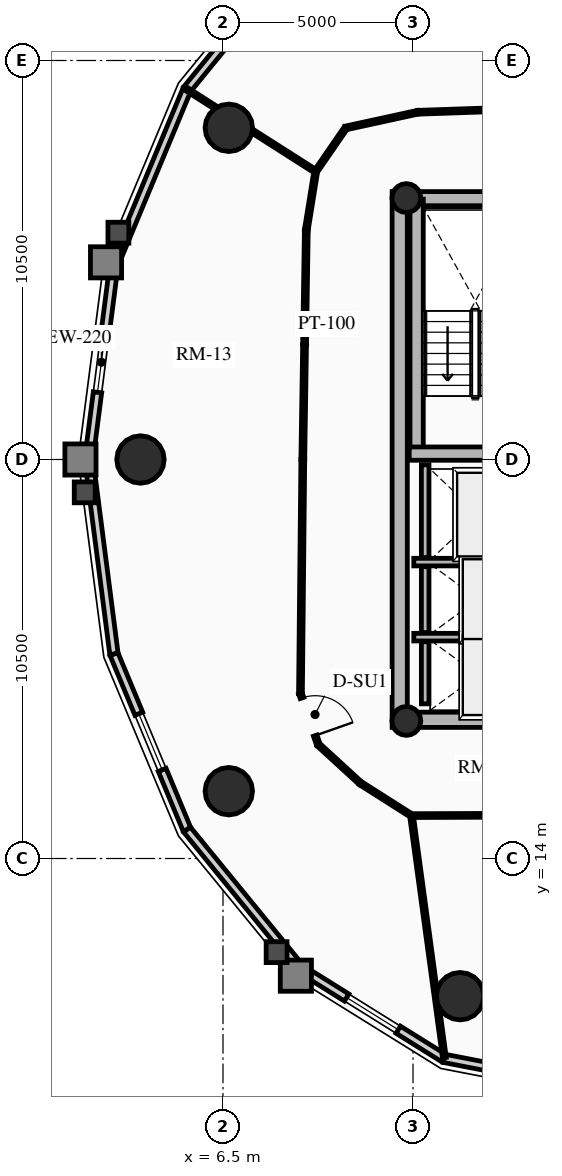
"""IFC4 building model, lengths in metres.
Left out: names, types, materials, properties, quantities, classifications, styles, units other than length and angle.
Written with IfcOpenShell. Run it as: python <this file> out.ifc"""

import sys

from ifc_helpers import new_model, si_unit, direction, frame, frame_2d, origin, origin_2d, place, context, subcontext, project, spatial, rectangle, circle, hollow_circle, extrude, source, transform, mapped, element, fill, save


model = new_model("IFC4")
c1 = context("Model", 3, precision=1e-05, world=origin(), true_north=direction((0.0, 1.0)))
c2 = subcontext(c1, "Body", "Model", "MODEL_VIEW")
j1 = project(units=[si_unit("LENGTHUNIT", "METRE"), si_unit("PLANEANGLEUNIT", "RADIAN")], contexts=[c1])
p1 = place(None, origin())
s1 = spatial("IfcSite", under=j1, at=p1, CompositionType="ELEMENT")
p2 = place(p1, origin())
s2 = spatial("IfcBuilding", under=s1, at=p2, CompositionType="ELEMENT")
p3 = place(p2, frame((0.0, 0.0, 186.52)))
s3 = spatial("IfcBuildingStorey", under=s2, at=p3, CompositionType="ELEMENT", Elevation=186.52)
p4 = place(p3, frame((11.15, 17.45, 0.0), z_axis=(0.0, 0.0, 1.0), x_axis=(0.0, 1.0, 0.0)))
e1 = element("IfcWall", 1, at=p4, inside=s3, PredefinedType="SHEAR", context=c2, shape_type="SweptSolid", body=[
    extrude(rectangle(XDim=14.1, YDim=0.4, at=frame_2d((7.05, 0.0))), origin(), (0.0, 0.0, 1.0), 2.91),
])
p5 = place(p3, frame((11.15, 17.65, 0.0), z_axis=(0.0, 0.0, 1.0), x_axis=(1.0, 0.0, 0.0)))
e2 = element("IfcWall", 2, at=p5, inside=s3, PredefinedType="SHEAR", context=c2, shape_type="SweptSolid", body=[
    extrude(rectangle(XDim=10.7, YDim=0.4, at=frame_2d((5.35, 0.0))), origin(), (0.0, 0.0, 1.0), 2.91),
])
m1 = source(origin(), c2, "Body", "SweptSolid", [
    extrude(rectangle(XDim=1.5, YDim=2.02, at=frame_2d((0.75, 1.01))), frame((0.0, 0.21, 0.0), z_axis=(0.0, -1.0, 0.0), x_axis=(1.0, 0.0, 0.0)), (0.0, 0.0, 1.0), 0.42),
])
p6 = place(p5, frame((5.45, 0.0, 0.0)))
e3 = element("IfcOpeningElement", 3, at=p6, cuts=e2, PredefinedType="OPENING", context=c2, shape_type="MappedRepresentation", body=[
    mapped(m1, transform((0.0, 0.0, 0.0), x_axis=(1.0, 0.0, 0.0), y_axis=(0.0, 1.0, 0.0), z_axis=(0.0, 0.0, 1.0), scale=1.0)),
])
p7 = place(p3, frame((11.15, 31.35, 0.0), z_axis=(0.0, 0.0, 1.0), x_axis=(1.0, 0.0, 0.0)))
e4 = element("IfcWall", 4, at=p7, inside=s3, PredefinedType="SHEAR", context=c2, shape_type="SweptSolid", body=[
    extrude(rectangle(XDim=10.7, YDim=0.4, at=frame_2d((5.35, 0.0))), origin(), (0.0, 0.0, 1.0), 2.91),
])
p8 = place(p7, frame((4.6, 0.0, 0.0)))
e5 = element("IfcOpeningElement", 5, at=p8, cuts=e4, PredefinedType="OPENING", context=c2, shape_type="MappedRepresentation", body=[
    mapped(m1, transform((0.0, 0.0, 0.0), x_axis=(1.0, 0.0, 0.0), y_axis=(0.0, 1.0, 0.0), z_axis=(0.0, 0.0, 1.0), scale=1.0)),
])
p9 = place(p3, frame((11.595, 24.655, 0.0), z_axis=(0.0, 0.0, 1.0), x_axis=(0.0, 1.0, 0.0)))
e6 = element("IfcWall", 6, at=p9, inside=s3, PredefinedType="SHEAR", context=c2, shape_type="SweptSolid", body=[
    extrude(rectangle(XDim=6.695, YDim=0.35, at=frame_2d((3.348, 0.0))), origin(), (0.0, 0.0, 1.0), 2.91),
])
p10 = place(p3, frame((11.4, 24.655, 0.0), z_axis=(0.0, 0.0, 1.0), x_axis=(1.0, 0.0, 0.0)))
e7 = element("IfcWall", 7, at=p10, inside=s3, PredefinedType="SHEAR", context=c2, shape_type="SweptSolid", body=[
    extrude(rectangle(XDim=3.285, YDim=0.35, at=frame_2d((1.643, 0.0))), origin(), (0.0, 0.0, 1.0), 2.91),
])
for number, where, z_axis, x_axis in (
    (8, (11.325, 17.62, 0.0), (0.0, 0.0, 1.0), (1.0, 0.0, 0.0)),
    (9, (11.325, 31.38, 0.0), (0.0, 0.0, 1.0), (1.0, 0.0, 0.0)),
):
    element("IfcColumn", number, at=place(p3, frame(where, z_axis=z_axis, x_axis=x_axis)), inside=s3, PredefinedType="COLUMN", context=c2, shape_type="SweptSolid", body=[
        extrude(hollow_circle(Radius=0.38, WallThickness=0.032, at=origin_2d()), origin(), (0.0, 0.0, 1.0), 2.91),
    ])
for number, where, z_axis, x_axis in (
    (10, (6.653, 33.229, 0.0), (0.0, 0.0, 1.0), (1.0, 0.0, 0.0)),
    (11, (4.328, 24.5, 0.0), (0.0, 0.0, 1.0), (1.0, 0.0, 0.0)),
    (12, (6.653, 15.771, 0.0), (0.0, 0.0, 1.0), (1.0, 0.0, 0.0)),
    (13, (12.739, 10.377, 0.0), (0.0, 0.0, 1.0), (1.0, 0.0, 0.0)),
):
    element("IfcColumn", number, at=place(p3, frame(where, z_axis=z_axis, x_axis=x_axis)), inside=s3, PredefinedType="USERDEFINED", context=c2, shape_type="SweptSolid", body=[
        extrude(circle(Radius=0.625, at=origin_2d()), origin(), (0.0, 0.0, 1.0), 2.91),
    ])
p11 = place(p3, frame((5.553, 34.24, 0.0), z_axis=(0.0, 0.0, 1.0), x_axis=(0.632470615287, 0.774584353572, 0.0)))
e14 = element("IfcWall", 14, at=p11, inside=s3, PredefinedType="SOLIDWALL", context=c2, shape_type="SweptSolid", body=[
    extrude(rectangle(XDim=4.733, YDim=0.22, at=frame_2d((2.366, 0.0))), origin(), (0.0, 0.0, 1.0), 2.245),
])
m2 = source(origin(), c2, "Body", "SweptSolid", [
    extrude(rectangle(XDim=1.6, YDim=1.3, at=frame_2d((0.8, 0.65))), frame((0.0, 0.12, 0.0), z_axis=(0.0, -1.0, 0.0), x_axis=(1.0, 0.0, 0.0)), (0.0, 0.0, 1.0), 0.24),
])
p12 = place(p11, frame((1.566, 0.0, 0.65)))
e15 = element("IfcOpeningElement", 15, at=p12, cuts=e14, PredefinedType="OPENING", context=c2, shape_type="MappedRepresentation", body=[
    mapped(m2, transform((0.0, 0.0, 0.0), x_axis=(1.0, 0.0, 0.0), y_axis=(0.0, 1.0, 0.0), z_axis=(0.0, 0.0, 1.0), scale=1.0)),
])
p13 = place(p3, frame((3.631, 29.62, 0.0), z_axis=(0.0, 0.0, 1.0), x_axis=(0.384144094086, 0.923273152961, 0.0)))
e16 = element("IfcWall", 16, at=p13, inside=s3, PredefinedType="SOLIDWALL", context=c2, shape_type="SweptSolid", body=[
    extrude(rectangle(XDim=5.003, YDim=0.22, at=frame_2d((2.501, 0.0))), origin(), (0.0, 0.0, 1.0), 2.245),
])
p14 = place(p3, frame((2.969, 24.5, 0.0), z_axis=(0.0, 0.0, 1.0), x_axis=(0.128287912609, 0.991736966881, 0.0)))
e17 = element("IfcWall", 17, at=p14, inside=s3, PredefinedType="SOLIDWALL", context=c2, shape_type="SweptSolid", body=[
    extrude(rectangle(XDim=5.163, YDim=0.22, at=frame_2d((2.582, 0.0))), origin(), (0.0, 0.0, 1.0), 2.245),
])
p15 = place(p14, frame((1.782, 0.0, 0.65)))
e18 = element("IfcOpeningElement", 18, at=p15, cuts=e17, PredefinedType="OPENING", context=c2, shape_type="MappedRepresentation", body=[
    mapped(m2, transform((0.0, 0.0, 0.0), x_axis=(1.0, 0.0, 0.0), y_axis=(0.0, 1.0, 0.0), z_axis=(0.0, 0.0, 1.0), scale=1.0)),
])
p16 = place(p3, frame((3.631, 19.38, 0.0), z_axis=(0.0, 0.0, 1.0), x_axis=(-0.128287912609, 0.991736966881, 0.0)))
e19 = element("IfcWall", 19, at=p16, inside=s3, PredefinedType="SOLIDWALL", context=c2, shape_type="SweptSolid", body=[
    extrude(rectangle(XDim=5.163, YDim=0.22, at=frame_2d((2.582, 0.0))), origin(), (0.0, 0.0, 1.0), 2.245),
])
p17 = place(p3, frame((5.553, 14.76, 0.0), z_axis=(0.0, 0.0, 1.0), x_axis=(-0.384144094086, 0.923273152961, 0.0)))
e20 = element("IfcWall", 20, at=p17, inside=s3, PredefinedType="SOLIDWALL", context=c2, shape_type="SweptSolid", body=[
    extrude(rectangle(XDim=5.003, YDim=0.22, at=frame_2d((2.501, 0.0))), origin(), (0.0, 0.0, 1.0), 2.245),
])
p18 = place(p17, frame((1.702, 0.0, 0.65)))
e21 = element("IfcOpeningElement", 21, at=p18, cuts=e20, PredefinedType="OPENING", context=c2, shape_type="MappedRepresentation", body=[
    mapped(m2, transform((0.0, 0.0, 0.0), x_axis=(1.0, 0.0, 0.0), y_axis=(0.0, 1.0, 0.0), z_axis=(0.0, 0.0, 1.0), scale=1.0)),
])
p19 = place(p3, frame((8.547, 11.094, 0.0), z_axis=(0.0, 0.0, 1.0), x_axis=(-0.632470615287, 0.774584353572, 0.0)))
e22 = element("IfcWall", 22, at=p19, inside=s3, PredefinedType="SOLIDWALL", context=c2, shape_type="SweptSolid", body=[
    extrude(rectangle(XDim=4.733, YDim=0.22, at=frame_2d((2.366, 0.0))), origin(), (0.0, 0.0, 1.0), 2.245),
])
p20 = place(p3, frame((12.319, 8.741, 0.0), z_axis=(0.0, 0.0, 1.0), x_axis=(-0.848399108042, 0.529357113368, 0.0)))
e23 = element("IfcWall", 23, at=p20, inside=s3, PredefinedType="SOLIDWALL", context=c2, shape_type="SweptSolid", body=[
    extrude(rectangle(XDim=4.446, YDim=0.22, at=frame_2d((2.223, 0.0))), origin(), (0.0, 0.0, 1.0), 2.245),
])
p21 = place(p20, frame((1.423, 0.0, 0.65)))
e24 = element("IfcOpeningElement", 24, at=p21, cuts=e23, PredefinedType="OPENING", context=c2, shape_type="MappedRepresentation", body=[
    mapped(m2, transform((0.0, 0.0, 0.0), x_axis=(1.0, 0.0, 0.0), y_axis=(0.0, 1.0, 0.0), z_axis=(0.0, 0.0, 1.0), scale=1.0)),
])
p22 = place(p3, frame((16.5, 7.93, 0.0), z_axis=(0.0, 0.0, 1.0), x_axis=(-0.981703883443, 0.190413983815, 0.0)))
e25 = element("IfcWall", 25, at=p22, inside=s3, PredefinedType="SOLIDWALL", context=c2, shape_type="SweptSolid", body=[
    extrude(rectangle(XDim=4.259, YDim=0.22, at=frame_2d((2.13, 0.0))), origin(), (0.0, 0.0, 1.0), 2.245),
])
p23 = place(p22, frame((1.33, 0.0, 0.65)))
e26 = element("IfcOpeningElement", 26, at=p23, cuts=e25, PredefinedType="OPENING", context=c2, shape_type="MappedRepresentation", body=[
    mapped(m2, transform((0.0, 0.0, 0.0), x_axis=(1.0, 0.0, 0.0), y_axis=(0.0, 1.0, 0.0), z_axis=(0.0, 0.0, 1.0), scale=1.0)),
])
p24 = place(p3, frame((11.52, 21.8, 0.0), z_axis=(0.0, 0.0, 1.0), x_axis=(1.0, 0.0, 0.0)))
e27 = element("IfcWall", 27, at=p24, inside=s3, PredefinedType="SHEAR", context=c2, shape_type="SweptSolid", body=[
    extrude(rectangle(XDim=2.97, YDim=0.2, at=frame_2d((1.485, 0.0))), origin(), (0.0, 0.0, 1.0), 2.91),
])
p25 = place(p3, frame((11.82, 21.92, 0.0), z_axis=(0.0, 0.0, 1.0), x_axis=(0.0, 1.0, 0.0)))
e28 = element("IfcWall", 28, at=p25, inside=s3, PredefinedType="SHEAR", context=c2, shape_type="SweptSolid", body=[
    extrude(rectangle(XDim=2.44, YDim=0.2, at=frame_2d((1.22, 0.0))), origin(), (0.0, 0.0, 1.0), 2.91),
])
p26 = place(p3, frame((11.52, 19.825, 0.0), z_axis=(0.0, 0.0, 1.0), x_axis=(1.0, 0.0, 0.0)))
e29 = element("IfcWall", 29, at=p26, inside=s3, PredefinedType="SHEAR", context=c2, shape_type="SweptSolid", body=[
    extrude(rectangle(XDim=2.97, YDim=0.2, at=frame_2d((1.485, 0.0))), origin(), (0.0, 0.0, 1.0), 2.91),
])
p27 = place(p3, frame((11.82, 19.945, 0.0), z_axis=(0.0, 0.0, 1.0), x_axis=(0.0, 1.0, 0.0)))
e30 = element("IfcWall", 30, at=p27, inside=s3, PredefinedType="SHEAR", context=c2, shape_type="SweptSolid", body=[
    extrude(rectangle(XDim=1.735, YDim=0.2, at=frame_2d((0.867, 0.0))), origin(), (0.0, 0.0, 1.0), 2.91),
])
p28 = place(p3, frame((11.82, 18.07, 0.0), z_axis=(0.0, 0.0, 1.0), x_axis=(0.0, 1.0, 0.0)))
e31 = element("IfcWall", 31, at=p28, inside=s3, PredefinedType="SHEAR", context=c2, shape_type="SweptSolid", body=[
    extrude(rectangle(XDim=1.635, YDim=0.2, at=frame_2d((0.817, 0.0))), origin(), (0.0, 0.0, 1.0), 2.91),
])
p29 = place(p3, frame((18.143, 33.86, 0.0), z_axis=(0.0, 0.0, 1.0), x_axis=(-0.999419208319, -0.034077060363, 0.0)))
e32 = element("IfcWall", 32, at=p29, inside=s3, PredefinedType="MOVABLE", context=c2, shape_type="SweptSolid", body=[
    extrude(rectangle(XDim=6.527, YDim=0.1, at=frame_2d((3.263, 0.0))), origin(), (0.0, 0.0, 1.0), 2.245),
])
m3 = source(origin(), c2, "Body", "SweptSolid", [
    extrude(rectangle(XDim=1.05, YDim=2.015, at=frame_2d((0.525, 1.007))), frame((0.0, 0.06, 0.0), z_axis=(0.0, -1.0, 0.0), x_axis=(1.0, 0.0, 0.0)), (0.0, 0.0, 1.0), 0.12),
])
p30 = place(p29, frame((2.738, 0.0, 0.0)))
e33 = element("IfcOpeningElement", 33, at=p30, cuts=e32, PredefinedType="OPENING", context=c2, shape_type="MappedRepresentation", body=[
    mapped(m3, transform((0.0, 0.0, 0.0), x_axis=(1.0, 0.0, 0.0), y_axis=(0.0, 1.0, 0.0), z_axis=(0.0, 0.0, 1.0), scale=1.0)),
])
p31 = place(p3, frame((11.62, 33.637, 0.0), z_axis=(0.0, 0.0, 1.0), x_axis=(-0.97702579435, -0.213121085711, 0.0)))
e34 = element("IfcWall", 34, at=p31, inside=s3, PredefinedType="MOVABLE", context=c2, shape_type="SweptSolid", body=[
    extrude(rectangle(XDim=1.935, YDim=0.1, at=frame_2d((0.967, 0.0))), origin(), (0.0, 0.0, 1.0), 2.245),
])
p32 = place(p3, frame((9.729, 33.225, 0.0), z_axis=(0.0, 0.0, 1.0), x_axis=(-0.567183649484, -0.82359134755, 0.0)))
e35 = element("IfcWall", 35, at=p32, inside=s3, PredefinedType="MOVABLE", context=c2, shape_type="SweptSolid", body=[
    extrude(rectangle(XDim=1.392, YDim=0.1, at=frame_2d((0.696, 0.0))), origin(), (0.0, 0.0, 1.0), 2.245),
])
p33 = place(p3, frame((8.94, 32.078, 0.0), z_axis=(0.0, 0.0, 1.0), x_axis=(-0.159148467753, -0.98725466077, 0.0)))
e36 = element("IfcWall", 36, at=p33, inside=s3, PredefinedType="MOVABLE", context=c2, shape_type="SweptSolid", body=[
    extrude(rectangle(XDim=1.554, YDim=0.1, at=frame_2d((0.777, 0.0))), origin(), (0.0, 0.0, 1.0), 2.245),
])
p34 = place(p3, frame((8.693, 30.544, 0.0), z_axis=(0.0, 0.0, 1.0), x_axis=(-0.015307007986, -0.99988284089, 0.0)))
e37 = element("IfcWall", 37, at=p34, inside=s3, PredefinedType="MOVABLE", context=c2, shape_type="SweptSolid", body=[
    extrude(rectangle(XDim=6.045, YDim=0.1, at=frame_2d((3.022, 0.0))), origin(), (0.0, 0.0, 1.0), 2.675),
])
p35 = place(p3, frame((8.6, 24.5, 0.0), z_axis=(0.0, 0.0, 1.0), x_axis=(-0.010023665349, -0.999949761805, 0.0)))
e38 = element("IfcWall", 38, at=p35, inside=s3, PredefinedType="MOVABLE", context=c2, shape_type="SweptSolid", body=[
    extrude(rectangle(XDim=6.162, YDim=0.1, at=frame_2d((3.081, 0.0))), origin(), (0.0, 0.0, 1.0), 2.245),
])
p36 = place(p3, frame((8.538, 18.338, 0.0), z_axis=(0.0, 0.0, 1.0), x_axis=(0.331358150167, -0.94350504838, 0.0)))
e39 = element("IfcWall", 39, at=p36, inside=s3, PredefinedType="MOVABLE", context=c2, shape_type="SweptSolid", body=[
    extrude(rectangle(XDim=1.424, YDim=0.1, at=frame_2d((0.712, 0.0))), origin(), (0.0, 0.0, 1.0), 2.245),
])
p37 = place(p36, frame((0.12, 0.0, 0.0)))
e40 = element("IfcOpeningElement", 40, at=p37, cuts=e39, PredefinedType="OPENING", context=c2, shape_type="MappedRepresentation", body=[
    mapped(m3, transform((0.0, 0.0, 0.0), x_axis=(1.0, 0.0, 0.0), y_axis=(0.0, 1.0, 0.0), z_axis=(0.0, 0.0, 1.0), scale=1.0)),
])
p38 = place(p3, frame((9.01, 16.994, 0.0), z_axis=(0.0, 0.0, 1.0), x_axis=(0.737701798986, -0.67512669609, 0.0)))
e41 = element("IfcWall", 41, at=p38, inside=s3, PredefinedType="MOVABLE", context=c2, shape_type="SweptSolid", body=[
    extrude(rectangle(XDim=1.498, YDim=0.1, at=frame_2d((0.749, 0.0))), origin(), (0.0, 0.0, 1.0), 2.245),
])
p39 = place(p3, frame((10.115, 15.983, 0.0), z_axis=(0.0, 0.0, 1.0), x_axis=(0.843995849351, -0.536349705209, 0.0)))
e42 = element("IfcWall", 42, at=p39, inside=s3, PredefinedType="MOVABLE", context=c2, shape_type="SweptSolid", body=[
    extrude(rectangle(XDim=1.593, YDim=0.1, at=frame_2d((0.796, 0.0))), origin(), (0.0, 0.0, 1.0), 2.245),
])
p40 = place(p3, frame((11.46, 15.129, 0.0), z_axis=(0.0, 0.0, 1.0), x_axis=(0.999993513287, 0.003601858435, 0.0)))
e43 = element("IfcWall", 43, at=p40, inside=s3, PredefinedType="MOVABLE", context=c2, shape_type="SweptSolid", body=[
    extrude(rectangle(XDim=3.321, YDim=0.1, at=frame_2d((1.661, 0.0))), origin(), (0.0, 0.0, 1.0), 2.245),
])
p41 = place(p3, frame((8.94, 32.078, 0.0), z_axis=(0.0, 0.0, 1.0), x_axis=(-0.843153138911, 0.53767349232, 0.0)))
e44 = element("IfcWall", 44, at=p41, inside=s3, PredefinedType="MOVABLE", context=c2, shape_type="SweptSolid", body=[
    extrude(rectangle(XDim=3.998, YDim=0.1, at=frame_2d((1.999, 0.0))), origin(), (0.0, 0.0, 1.0), 2.245),
])
p42 = place(p3, frame((11.46, 15.129, 0.0), z_axis=(0.0, 0.0, 1.0), x_axis=(0.134621607411, -0.990897079831, 0.0)))
e45 = element("IfcWall", 45, at=p42, inside=s3, PredefinedType="MOVABLE", context=c2, shape_type="SweptSolid", body=[
    extrude(rectangle(XDim=6.427, YDim=0.1, at=frame_2d((3.214, 0.0))), origin(), (0.0, 0.0, 1.0), 2.245),
])
m4 = source(origin(), c2, "Body", "SweptSolid", [
    extrude(rectangle(XDim=1.6, YDim=1.3, at=frame_2d((0.8, 0.65))), frame((0.0, 0.03, 0.0), z_axis=(0.0, -1.0, 0.0), x_axis=(1.0, 0.0, 0.0)), (0.0, 0.0, 1.0), 0.06),
])
p43 = place(p15, origin())
e46 = element("IfcWindow", 46, at=p43, inside=s3, PartitioningType="SINGLE_PANEL", PredefinedType="WINDOW", context=c2, shape_type="MappedRepresentation", body=[
    mapped(m4, transform((0.0, 0.0, 0.0), x_axis=(1.0, 0.0, 0.0), y_axis=(0.0, 1.0, 0.0), z_axis=(0.0, 0.0, 1.0), scale=1.0)),
])
fill(e18, e46)
p44 = place(p18, origin())
e47 = element("IfcWindow", 47, at=p44, inside=s3, PartitioningType="SINGLE_PANEL", PredefinedType="WINDOW", context=c2, shape_type="MappedRepresentation", body=[
    mapped(m4, transform((0.0, 0.0, 0.0), x_axis=(1.0, 0.0, 0.0), y_axis=(0.0, 1.0, 0.0), z_axis=(0.0, 0.0, 1.0), scale=1.0)),
])
fill(e21, e47)
p45 = place(p21, origin())
e48 = element("IfcWindow", 48, at=p45, inside=s3, PartitioningType="SINGLE_PANEL", PredefinedType="WINDOW", context=c2, shape_type="MappedRepresentation", body=[
    mapped(m4, transform((0.0, 0.0, 0.0), x_axis=(1.0, 0.0, 0.0), y_axis=(0.0, 1.0, 0.0), z_axis=(0.0, 0.0, 1.0), scale=1.0)),
])
fill(e24, e48)
m5 = source(origin(), c2, "Body", "SweptSolid", [
    extrude(rectangle(XDim=1.05, YDim=2.015, at=frame_2d((0.525, 1.007))), frame((0.0, 0.025, 0.0), z_axis=(0.0, -1.0, 0.0), x_axis=(1.0, 0.0, 0.0)), (0.0, 0.0, 1.0), 0.05),
])
p46 = place(p37, origin())
e49 = element("IfcDoor", 49, at=p46, inside=s3, OperationType="SINGLE_SWING_RIGHT", PredefinedType="DOOR", context=c2, shape_type="MappedRepresentation", body=[
    mapped(m5, transform((0.0, 0.0, 0.0), x_axis=(1.0, 0.0, 0.0), y_axis=(0.0, 1.0, 0.0), z_axis=(0.0, 0.0, 1.0), scale=1.0)),
])
fill(e40, e49)
save(model, sys.argv[1])
